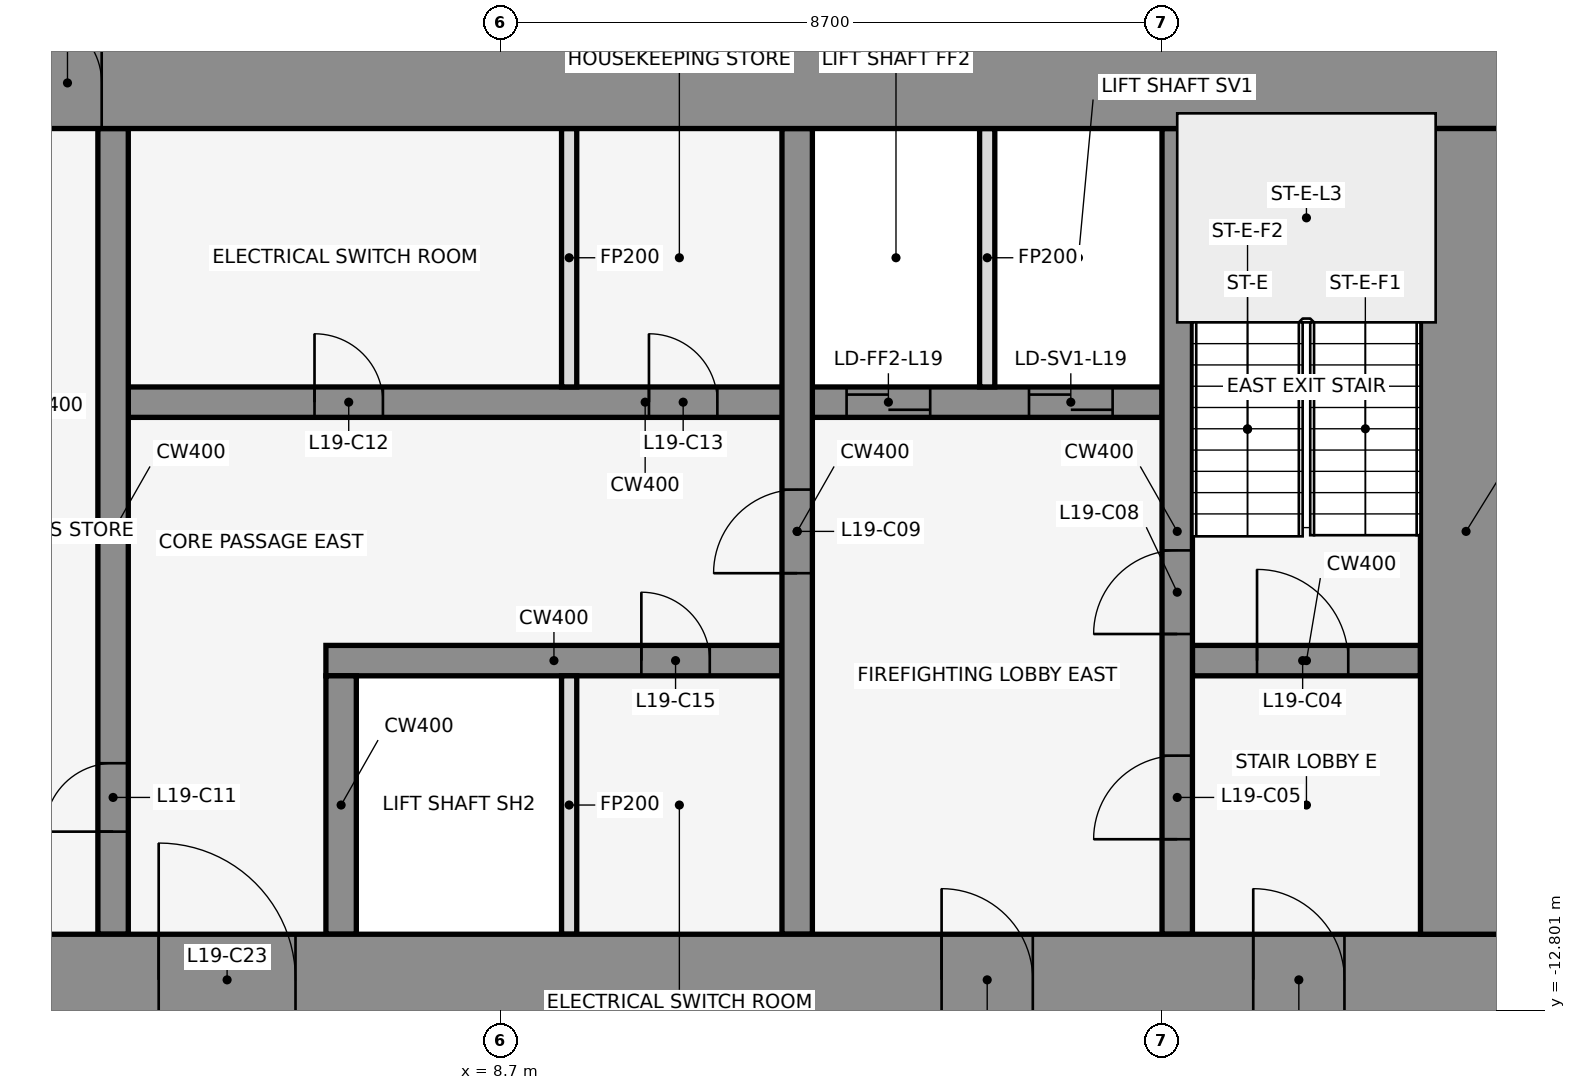
"""IFC4 building model, lengths in metres.
Left out: names, types, materials, properties, quantities, classifications, styles, units other than length and angle.
Written with IfcOpenShell. Run it as: python <this file> out.ifc"""

import sys

from ifc_helpers import new_model, si_unit, direction, frame, frame_2d, origin, place, context, subcontext, project, spatial, rectangle, extrude, element, fill, save


model = new_model("IFC4")
c1 = context("Model", 3, precision=1e-05, world=origin(), true_north=direction((0.0, 1.0)))
c2 = subcontext(c1, "Body", "Model", "MODEL_VIEW")
j1 = project(units=[si_unit("LENGTHUNIT", "METRE"), si_unit("PLANEANGLEUNIT", "RADIAN")], contexts=[c1])
p1 = place(None, origin())
s1 = spatial("IfcSite", under=j1, at=p1, CompositionType="ELEMENT")
p2 = place(p1, origin())
s2 = spatial("IfcBuilding", under=s1, at=p2, CompositionType="ELEMENT")
p3 = place(p2, frame((0.0, 0.0, 94.0)))
s3 = spatial("IfcBuildingStorey", under=s2, at=p3, CompositionType="ELEMENT", Elevation=94.0)
p4 = place(p3, frame((16.432, -0.105, 0.0), z_axis=(0.0, 0.0, 1.0), x_axis=(-0.83981312244, 0.542875602121, 0.0)))
e1 = element("IfcWall", 1, at=p4, inside=s3, PredefinedType="STANDARD", context=c2, shape_type="SweptSolid", body=[
    extrude(rectangle(XDim=2.183, YDim=0.25, at=frame_2d((1.091, 0.0))), origin(), (0.0, 0.0, 1.0), 3.95),
])
p5 = place(p3, frame((6.4, -8.2, 0.0), z_axis=(0.0, 0.0, 1.0), x_axis=(1.0, 0.0, 0.0)))
e2 = element("IfcWall", 2, at=p5, inside=s3, PredefinedType="SHEAR", context=c2, shape_type="SweptSolid", body=[
    extrude(rectangle(XDim=6.0, YDim=0.4, at=frame_2d((3.0, 0.0))), origin(), (0.0, 0.0, 1.0), 4.1),
])
p6 = place(p5, frame((4.15, 0.0, 0.0)))
e3 = element("IfcOpeningElement", 3, at=p6, cuts=e2, PredefinedType="OPENING", context=c2, shape_type="SweptSolid", body=[
    extrude(rectangle(XDim=0.9, YDim=2.1, at=frame_2d((0.45, 1.05))), frame((0.0, 0.212, 0.0), z_axis=(0.0, -1.0, 0.0), x_axis=(1.0, 0.0, 0.0)), (0.0, 0.0, 1.0), 0.424),
])
p7 = place(p3, frame((17.8, -8.2, 0.0), z_axis=(0.0, 0.0, 1.0), x_axis=(1.0, 0.0, 0.0)))
e4 = element("IfcWall", 4, at=p7, inside=s3, PredefinedType="SHEAR", context=c2, shape_type="SweptSolid", body=[
    extrude(rectangle(XDim=3.0, YDim=0.4, at=frame_2d((1.5, 0.0))), origin(), (0.0, 0.0, 1.0), 4.1),
])
p8 = place(p7, frame((0.85, 0.0, 0.0)))
e5 = element("IfcOpeningElement", 5, at=p8, cuts=e4, PredefinedType="OPENING", context=c2, shape_type="SweptSolid", body=[
    extrude(rectangle(XDim=1.2, YDim=2.1, at=frame_2d((0.6, 1.05))), frame((0.0, 0.212, 0.0), z_axis=(0.0, -1.0, 0.0), x_axis=(1.0, 0.0, 0.0)), (0.0, 0.0, 1.0), 0.424),
])
p9 = place(p3, frame((3.8, -4.8, 0.0), z_axis=(0.0, 0.0, 1.0), x_axis=(1.0, 0.0, 0.0)))
e6 = element("IfcWall", 6, at=p9, inside=s3, PredefinedType="SHEAR", context=c2, shape_type="SweptSolid", body=[
    extrude(rectangle(XDim=13.6, YDim=0.4, at=frame_2d((6.8, 0.0))), origin(), (0.0, 0.0, 1.0), 4.1),
])
p10 = place(p9, frame((9.45, 0.0, 0.0)))
e7 = element("IfcOpeningElement", 7, at=p10, cuts=e6, PredefinedType="OPENING", context=c2, shape_type="SweptSolid", body=[
    extrude(rectangle(XDim=1.1, YDim=2.1, at=frame_2d((0.55, 1.05))), frame((0.0, 0.212, 0.0), z_axis=(0.0, -1.0, 0.0), x_axis=(1.0, 0.0, 0.0)), (0.0, 0.0, 1.0), 0.424),
])
p11 = place(p9, frame((11.85, 0.0, 0.0)))
e8 = element("IfcOpeningElement", 8, at=p11, cuts=e6, PredefinedType="OPENING", context=c2, shape_type="SweptSolid", body=[
    extrude(rectangle(XDim=1.1, YDim=2.1, at=frame_2d((0.55, 1.05))), frame((0.0, 0.212, 0.0), z_axis=(0.0, -1.0, 0.0), x_axis=(1.0, 0.0, 0.0)), (0.0, 0.0, 1.0), 0.424),
])
p12 = place(p9, frame((2.45, 0.0, 0.0)))
e9 = element("IfcOpeningElement", 9, at=p12, cuts=e6, PredefinedType="OPENING", context=c2, shape_type="SweptSolid", body=[
    extrude(rectangle(XDim=0.9, YDim=2.1, at=frame_2d((0.45, 1.05))), frame((0.0, 0.212, 0.0), z_axis=(0.0, -1.0, 0.0), x_axis=(1.0, 0.0, 0.0)), (0.0, 0.0, 1.0), 0.424),
])
p13 = place(p9, frame((6.85, 0.0, 0.0)))
e10 = element("IfcOpeningElement", 10, at=p13, cuts=e6, PredefinedType="OPENING", context=c2, shape_type="SweptSolid", body=[
    extrude(rectangle(XDim=0.9, YDim=2.1, at=frame_2d((0.45, 1.05))), frame((0.0, 0.212, 0.0), z_axis=(0.0, -1.0, 0.0), x_axis=(1.0, 0.0, 0.0)), (0.0, 0.0, 1.0), 0.424),
])
p14 = place(p3, frame((3.6, -11.8, 0.0), z_axis=(0.0, 0.0, 1.0), x_axis=(0.0, 1.0, 0.0)))
e11 = element("IfcWall", 11, at=p14, inside=s3, PredefinedType="SHEAR", context=c2, shape_type="SweptSolid", body=[
    extrude(rectangle(XDim=10.6, YDim=0.4, at=frame_2d((5.3, 0.0))), origin(), (0.0, 0.0, 1.0), 4.1),
])
p15 = place(p14, frame((1.35, 0.0, 0.0)))
e12 = element("IfcOpeningElement", 12, at=p15, cuts=e11, PredefinedType="OPENING", context=c2, shape_type="SweptSolid", body=[
    extrude(rectangle(XDim=0.9, YDim=2.1, at=frame_2d((0.45, 1.05))), frame((0.0, 0.212, 0.0), z_axis=(0.0, -1.0, 0.0), x_axis=(1.0, 0.0, 0.0)), (0.0, 0.0, 1.0), 0.424),
])
p16 = place(p3, frame((6.6, -11.8, 0.0), z_axis=(0.0, 0.0, 1.0), x_axis=(0.0, 1.0, 0.0)))
e13 = element("IfcWall", 13, at=p16, inside=s3, PredefinedType="SHEAR", context=c2, shape_type="SweptSolid", body=[
    extrude(rectangle(XDim=3.4, YDim=0.4, at=frame_2d((1.7, 0.0))), origin(), (0.0, 0.0, 1.0), 4.1),
])
for number, where, z_axis, x_axis in (
    (14, (9.6, -11.8, 0.0), (0.0, 0.0, 1.0), (0.0, 1.0, 0.0)),
    (15, (9.6, -4.6, 0.0), (0.0, 0.0, 1.0), (0.0, 1.0, 0.0)),
):
    element("IfcWall", number, at=place(p3, frame(where, z_axis=z_axis, x_axis=x_axis)), inside=s3, PredefinedType="PARTITIONING", context=c2, shape_type="SweptSolid", body=[
        extrude(rectangle(XDim=3.4, YDim=0.2, at=frame_2d((1.7, 0.0))), origin(), (0.0, 0.0, 1.0), 3.018),
    ])
p17 = place(p3, frame((12.6, -11.8, 0.0), z_axis=(0.0, 0.0, 1.0), x_axis=(0.0, 1.0, 0.0)))
e16 = element("IfcWall", 16, at=p17, inside=s3, PredefinedType="SHEAR", context=c2, shape_type="SweptSolid", body=[
    extrude(rectangle(XDim=10.6, YDim=0.4, at=frame_2d((5.3, 0.0))), origin(), (0.0, 0.0, 1.0), 4.1),
])
p18 = place(p17, frame((4.75, 0.0, 0.0)))
e17 = element("IfcOpeningElement", 17, at=p18, cuts=e16, PredefinedType="OPENING", context=c2, shape_type="SweptSolid", body=[
    extrude(rectangle(XDim=1.1, YDim=2.1, at=frame_2d((0.55, 1.05))), frame((0.0, 0.212, 0.0), z_axis=(0.0, -1.0, 0.0), x_axis=(1.0, 0.0, 0.0)), (0.0, 0.0, 1.0), 0.424),
])
p19 = place(p3, frame((15.1, -4.6, 0.0), z_axis=(0.0, 0.0, 1.0), x_axis=(0.0, 1.0, 0.0)))
e18 = element("IfcWall", 18, at=p19, inside=s3, PredefinedType="PARTITIONING", context=c2, shape_type="SweptSolid", body=[
    extrude(rectangle(XDim=3.4, YDim=0.2, at=frame_2d((1.7, 0.0))), origin(), (0.0, 0.0, 1.0), 3.018),
])
p20 = place(p3, frame((17.6, -11.8, 0.0), z_axis=(0.0, 0.0, 1.0), x_axis=(0.0, 1.0, 0.0)))
e19 = element("IfcWall", 19, at=p20, inside=s3, PredefinedType="SHEAR", context=c2, shape_type="SweptSolid", body=[
    extrude(rectangle(XDim=10.6, YDim=0.4, at=frame_2d((5.3, 0.0))), origin(), (0.0, 0.0, 1.0), 4.1),
])
p21 = place(p20, frame((1.25, 0.0, 0.0)))
e20 = element("IfcOpeningElement", 20, at=p21, cuts=e19, PredefinedType="OPENING", context=c2, shape_type="SweptSolid", body=[
    extrude(rectangle(XDim=1.1, YDim=2.1, at=frame_2d((0.55, 1.05))), frame((0.0, 0.212, 0.0), z_axis=(0.0, -1.0, 0.0), x_axis=(1.0, 0.0, 0.0)), (0.0, 0.0, 1.0), 0.424),
])
p22 = place(p20, frame((3.95, 0.0, 0.0)))
e21 = element("IfcOpeningElement", 21, at=p22, cuts=e19, PredefinedType="OPENING", context=c2, shape_type="SweptSolid", body=[
    extrude(rectangle(XDim=1.1, YDim=2.1, at=frame_2d((0.55, 1.05))), frame((0.0, 0.212, 0.0), z_axis=(0.0, -1.0, 0.0), x_axis=(1.0, 0.0, 0.0)), (0.0, 0.0, 1.0), 0.424),
])
p23 = place(p3, frame((-22.0, -0.6, 0.0), z_axis=(0.0, 0.0, 1.0), x_axis=(1.0, 0.0, 0.0)))
e22 = element("IfcWall", 22, at=p23, inside=s3, PredefinedType="SHEAR", context=c2, shape_type="SweptSolid", body=[
    extrude(rectangle(XDim=44.0, YDim=1.2, at=frame_2d((22.0, 0.0))), origin(), (0.0, 0.0, 1.0), 4.1),
])
p24 = place(p23, frame((18.55, 0.0, 0.0)))
e23 = element("IfcOpeningElement", 23, at=p24, cuts=e22, PredefinedType="OPENING", context=c2, shape_type="SweptSolid", body=[
    extrude(rectangle(XDim=0.9, YDim=2.1, at=frame_2d((0.45, 1.05))), frame((0.0, 0.612, 0.0), z_axis=(0.0, -1.0, 0.0), x_axis=(1.0, 0.0, 0.0)), (0.0, 0.0, 1.0), 1.224),
])
p25 = place(p23, frame((24.55, 0.0, 0.0)))
e24 = element("IfcOpeningElement", 24, at=p25, cuts=e22, PredefinedType="OPENING", context=c2, shape_type="SweptSolid", body=[
    extrude(rectangle(XDim=0.9, YDim=2.1, at=frame_2d((0.45, 1.05))), frame((0.0, 0.612, 0.0), z_axis=(0.0, -1.0, 0.0), x_axis=(1.0, 0.0, 0.0)), (0.0, 0.0, 1.0), 1.224),
])
p26 = place(p3, frame((-22.0, -12.4, 0.0), z_axis=(0.0, 0.0, 1.0), x_axis=(1.0, 0.0, 0.0)))
e25 = element("IfcWall", 25, at=p26, inside=s3, PredefinedType="SHEAR", context=c2, shape_type="SweptSolid", body=[
    extrude(rectangle(XDim=44.0, YDim=1.2, at=frame_2d((22.0, 0.0))), origin(), (0.0, 0.0, 1.0), 4.1),
])
p27 = place(p26, frame((2.2, 0.0, 0.0)))
e26 = element("IfcOpeningElement", 26, at=p27, cuts=e25, PredefinedType="OPENING", context=c2, shape_type="SweptSolid", body=[
    extrude(rectangle(XDim=1.2, YDim=2.1, at=frame_2d((0.6, 1.05))), frame((0.0, 0.612, 0.0), z_axis=(0.0, -1.0, 0.0), x_axis=(1.0, 0.0, 0.0)), (0.0, 0.0, 1.0), 1.224),
])
p28 = place(p26, frame((21.4, 0.0, 0.0)))
e27 = element("IfcOpeningElement", 27, at=p28, cuts=e25, PredefinedType="OPENING", context=c2, shape_type="SweptSolid", body=[
    extrude(rectangle(XDim=1.2, YDim=2.1, at=frame_2d((0.6, 1.05))), frame((0.0, 0.612, 0.0), z_axis=(0.0, -1.0, 0.0), x_axis=(1.0, 0.0, 0.0)), (0.0, 0.0, 1.0), 1.224),
])
p29 = place(p26, frame((40.6, 0.0, 0.0)))
e28 = element("IfcOpeningElement", 28, at=p29, cuts=e25, PredefinedType="OPENING", context=c2, shape_type="SweptSolid", body=[
    extrude(rectangle(XDim=1.2, YDim=2.1, at=frame_2d((0.6, 1.05))), frame((0.0, 0.612, 0.0), z_axis=(0.0, -1.0, 0.0), x_axis=(1.0, 0.0, 0.0)), (0.0, 0.0, 1.0), 1.224),
])
p30 = place(p26, frame((16.0, 0.0, 0.0)))
e29 = element("IfcOpeningElement", 29, at=p30, cuts=e25, PredefinedType="OPENING", context=c2, shape_type="SweptSolid", body=[
    extrude(rectangle(XDim=1.8, YDim=2.1, at=frame_2d((0.9, 1.05))), frame((0.0, 0.612, 0.0), z_axis=(0.0, -1.0, 0.0), x_axis=(1.0, 0.0, 0.0)), (0.0, 0.0, 1.0), 1.224),
])
p31 = place(p26, frame((6.3, 0.0, 0.0)))
e30 = element("IfcOpeningElement", 30, at=p31, cuts=e25, PredefinedType="OPENING", context=c2, shape_type="SweptSolid", body=[
    extrude(rectangle(XDim=1.2, YDim=2.1, at=frame_2d((0.6, 1.05))), frame((0.0, 0.612, 0.0), z_axis=(0.0, -1.0, 0.0), x_axis=(1.0, 0.0, 0.0)), (0.0, 0.0, 1.0), 1.224),
])
p32 = place(p26, frame((26.2, 0.0, 0.0)))
e31 = element("IfcOpeningElement", 31, at=p32, cuts=e25, PredefinedType="OPENING", context=c2, shape_type="SweptSolid", body=[
    extrude(rectangle(XDim=1.8, YDim=2.1, at=frame_2d((0.9, 1.05))), frame((0.0, 0.612, 0.0), z_axis=(0.0, -1.0, 0.0), x_axis=(1.0, 0.0, 0.0)), (0.0, 0.0, 1.0), 1.224),
])
p33 = place(p26, frame((36.5, 0.0, 0.0)))
e32 = element("IfcOpeningElement", 32, at=p33, cuts=e25, PredefinedType="OPENING", context=c2, shape_type="SweptSolid", body=[
    extrude(rectangle(XDim=1.2, YDim=2.1, at=frame_2d((0.6, 1.05))), frame((0.0, 0.612, 0.0), z_axis=(0.0, -1.0, 0.0), x_axis=(1.0, 0.0, 0.0)), (0.0, 0.0, 1.0), 1.224),
])
p34 = place(p3, frame((21.4, -11.8, 0.0), z_axis=(0.0, 0.0, 1.0), x_axis=(0.0, 1.0, 0.0)))
e33 = element("IfcWall", 33, at=p34, inside=s3, PredefinedType="SHEAR", context=c2, shape_type="SweptSolid", body=[
    extrude(rectangle(XDim=10.6, YDim=1.2, at=frame_2d((5.3, 0.0))), origin(), (0.0, 0.0, 1.0), 4.1),
])
p35 = place(p8, origin())
e34 = element("IfcDoor", 34, at=p35, inside=s3, OperationType="SINGLE_SWING_RIGHT", PredefinedType="DOOR", context=c2, shape_type="SweptSolid", body=[
    extrude(rectangle(XDim=1.2, YDim=2.1, at=frame_2d((0.6, 1.05))), frame((0.0, 0.025, 0.0), z_axis=(0.0, -1.0, 0.0), x_axis=(1.0, 0.0, 0.0)), (0.0, 0.0, 1.0), 0.05),
])
fill(e5, e34)
p36 = place(p21, origin())
e35 = element("IfcDoor", 35, at=p36, inside=s3, OperationType="SINGLE_SWING_LEFT", PredefinedType="DOOR", context=c2, shape_type="SweptSolid", body=[
    extrude(rectangle(XDim=1.1, YDim=2.1, at=frame_2d((0.55, 1.05))), frame((0.0, 0.025, 0.0), z_axis=(0.0, -1.0, 0.0), x_axis=(1.0, 0.0, 0.0)), (0.0, 0.0, 1.0), 0.05),
])
fill(e20, e35)
p37 = place(p10, origin())
e36 = element("IfcDoor", 36, at=p37, inside=s3, OperationType="DOUBLE_DOOR_SLIDING", PredefinedType="DOOR", context=c2, shape_type="SweptSolid", body=[
    extrude(rectangle(XDim=1.1, YDim=2.1, at=frame_2d((0.55, 1.05))), frame((0.0, 0.025, 0.0), z_axis=(0.0, -1.0, 0.0), x_axis=(1.0, 0.0, 0.0)), (0.0, 0.0, 1.0), 0.05),
])
fill(e7, e36)
p38 = place(p11, origin())
e37 = element("IfcDoor", 37, at=p38, inside=s3, OperationType="DOUBLE_DOOR_SLIDING", PredefinedType="DOOR", context=c2, shape_type="SweptSolid", body=[
    extrude(rectangle(XDim=1.1, YDim=2.1, at=frame_2d((0.55, 1.05))), frame((0.0, 0.025, 0.0), z_axis=(0.0, -1.0, 0.0), x_axis=(1.0, 0.0, 0.0)), (0.0, 0.0, 1.0), 0.05),
])
fill(e8, e37)
p39 = place(p22, origin())
e38 = element("IfcDoor", 38, at=p39, inside=s3, OperationType="SINGLE_SWING_RIGHT", PredefinedType="DOOR", context=c2, shape_type="SweptSolid", body=[
    extrude(rectangle(XDim=1.1, YDim=2.1, at=frame_2d((0.55, 1.05))), frame((0.0, 0.025, 0.0), z_axis=(0.0, -1.0, 0.0), x_axis=(1.0, 0.0, 0.0)), (0.0, 0.0, 1.0), 0.05),
])
fill(e21, e38)
p40 = place(p18, frame((1.1, 0.0, 0.0), z_axis=(0.0, 0.0, 1.0), x_axis=(-1.0, 0.0, 0.0)))
e39 = element("IfcDoor", 39, at=p40, inside=s3, OperationType="SINGLE_SWING_RIGHT", PredefinedType="DOOR", context=c2, shape_type="SweptSolid", body=[
    extrude(rectangle(XDim=1.1, YDim=2.1, at=frame_2d((0.55, 1.05))), frame((0.0, 0.025, 0.0), z_axis=(0.0, -1.0, 0.0), x_axis=(1.0, 0.0, 0.0)), (0.0, 0.0, 1.0), 0.05),
])
fill(e17, e39)
p41 = place(p15, origin())
e40 = element("IfcDoor", 40, at=p41, inside=s3, OperationType="SINGLE_SWING_LEFT", PredefinedType="DOOR", context=c2, shape_type="SweptSolid", body=[
    extrude(rectangle(XDim=0.9, YDim=2.1, at=frame_2d((0.45, 1.05))), frame((0.0, 0.025, 0.0), z_axis=(0.0, -1.0, 0.0), x_axis=(1.0, 0.0, 0.0)), (0.0, 0.0, 1.0), 0.05),
])
fill(e12, e40)
p42 = place(p12, origin())
e41 = element("IfcDoor", 41, at=p42, inside=s3, OperationType="SINGLE_SWING_RIGHT", PredefinedType="DOOR", context=c2, shape_type="SweptSolid", body=[
    extrude(rectangle(XDim=0.9, YDim=2.1, at=frame_2d((0.45, 1.05))), frame((0.0, 0.025, 0.0), z_axis=(0.0, -1.0, 0.0), x_axis=(1.0, 0.0, 0.0)), (0.0, 0.0, 1.0), 0.05),
])
fill(e9, e41)
p43 = place(p13, origin())
e42 = element("IfcDoor", 42, at=p43, inside=s3, OperationType="SINGLE_SWING_LEFT", PredefinedType="DOOR", context=c2, shape_type="SweptSolid", body=[
    extrude(rectangle(XDim=0.9, YDim=2.1, at=frame_2d((0.45, 1.05))), frame((0.0, 0.025, 0.0), z_axis=(0.0, -1.0, 0.0), x_axis=(1.0, 0.0, 0.0)), (0.0, 0.0, 1.0), 0.05),
])
fill(e10, e42)
p44 = place(p6, frame((0.9, 0.0, 0.0), z_axis=(0.0, 0.0, 1.0), x_axis=(-1.0, 0.0, 0.0)))
e43 = element("IfcDoor", 43, at=p44, inside=s3, OperationType="SINGLE_SWING_RIGHT", PredefinedType="DOOR", context=c2, shape_type="SweptSolid", body=[
    extrude(rectangle(XDim=0.9, YDim=2.1, at=frame_2d((0.45, 1.05))), frame((0.0, 0.025, 0.0), z_axis=(0.0, -1.0, 0.0), x_axis=(1.0, 0.0, 0.0)), (0.0, 0.0, 1.0), 0.05),
])
fill(e3, e43)
p45 = place(p25, origin())
e44 = element("IfcDoor", 44, at=p45, inside=s3, OperationType="SINGLE_SWING_LEFT", PredefinedType="DOOR", context=c2, shape_type="SweptSolid", body=[
    extrude(rectangle(XDim=0.9, YDim=2.1, at=frame_2d((0.45, 1.05))), frame((0.0, 0.025, 0.0), z_axis=(0.0, -1.0, 0.0), x_axis=(1.0, 0.0, 0.0)), (0.0, 0.0, 1.0), 0.05),
])
fill(e24, e44)
p46 = place(p29, frame((1.2, 0.0, 0.0), z_axis=(0.0, 0.0, 1.0), x_axis=(-1.0, 0.0, 0.0)))
e45 = element("IfcDoor", 45, at=p46, inside=s3, OperationType="SINGLE_SWING_RIGHT", PredefinedType="DOOR", context=c2, shape_type="SweptSolid", body=[
    extrude(rectangle(XDim=1.2, YDim=2.1, at=frame_2d((0.6, 1.05))), frame((0.0, 0.025, 0.0), z_axis=(0.0, -1.0, 0.0), x_axis=(1.0, 0.0, 0.0)), (0.0, 0.0, 1.0), 0.05),
])
fill(e28, e45)
p47 = place(p32, origin())
e46 = element("IfcDoor", 46, at=p47, inside=s3, OperationType="SINGLE_SWING_LEFT", PredefinedType="DOOR", context=c2, shape_type="SweptSolid", body=[
    extrude(rectangle(XDim=1.8, YDim=2.1, at=frame_2d((0.9, 1.05))), frame((0.0, 0.025, 0.0), z_axis=(0.0, -1.0, 0.0), x_axis=(1.0, 0.0, 0.0)), (0.0, 0.0, 1.0), 0.05),
])
fill(e31, e46)
p48 = place(p33, frame((1.2, 0.0, 0.0), z_axis=(0.0, 0.0, 1.0), x_axis=(-1.0, 0.0, 0.0)))
e47 = element("IfcDoor", 47, at=p48, inside=s3, OperationType="SINGLE_SWING_RIGHT", PredefinedType="DOOR", context=c2, shape_type="SweptSolid", body=[
    extrude(rectangle(XDim=1.2, YDim=2.1, at=frame_2d((0.6, 1.05))), frame((0.0, 0.025, 0.0), z_axis=(0.0, -1.0, 0.0), x_axis=(1.0, 0.0, 0.0)), (0.0, 0.0, 1.0), 0.05),
])
fill(e32, e47)
save(model, sys.argv[1])
